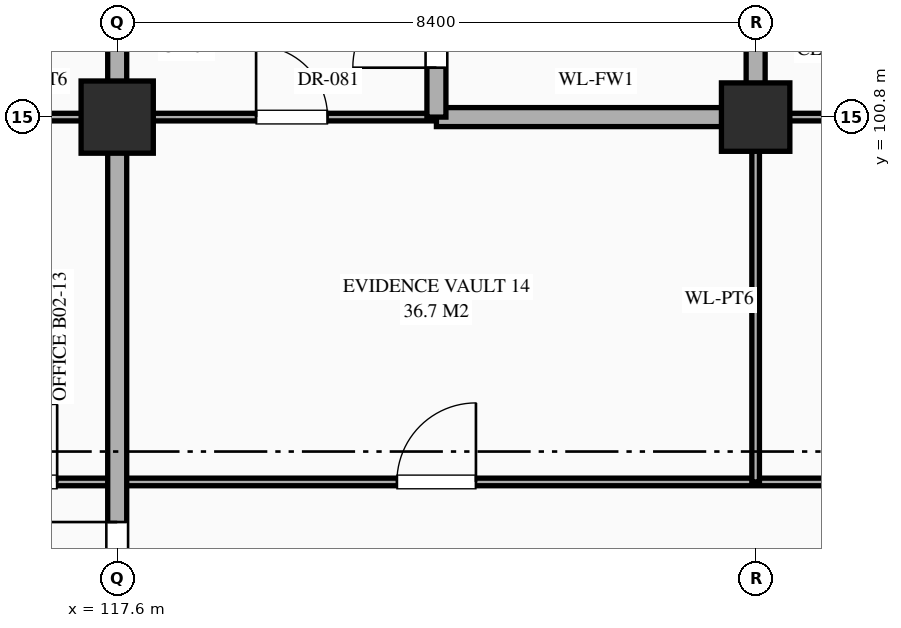
"""IFC4 building model, lengths in metres.
Left out: names, types, materials, properties, quantities, classifications, styles, units other than length and angle.
Written with IfcOpenShell. Run it as: python <this file> out.ifc"""

import sys

from ifc_helpers import new_model, si_unit, direction, frame, frame_2d, origin, origin_2d, place, context, subcontext, project, spatial, rectangle, extrude, element, fill, save


model = new_model("IFC4")
c1 = context("Model", 3, precision=1e-05, world=origin(), true_north=direction((0.0, 1.0)))
c2 = subcontext(c1, "Body", "Model", "MODEL_VIEW")
j1 = project(units=[si_unit("LENGTHUNIT", "METRE"), si_unit("PLANEANGLEUNIT", "RADIAN")], contexts=[c1])
p1 = place(None, origin())
s1 = spatial("IfcSite", under=j1, at=p1, CompositionType="ELEMENT")
p2 = place(p1, origin())
s2 = spatial("IfcBuilding", under=s1, at=p2, CompositionType="ELEMENT")
p3 = place(p2, frame((0.0, 0.0, -10.2)))
s3 = spatial("IfcBuildingStorey", under=s2, at=p3, CompositionType="ELEMENT", Elevation=-10.2)
p4 = place(p3, frame((117.6, 100.8, 0.0), z_axis=(0.0, 0.0, 1.0), x_axis=(1.0, 0.0, 0.0)))
e1 = element("IfcColumn", 1, at=p4, inside=s3, PredefinedType="COLUMN", context=c2, shape_type="SweptSolid", body=[
    extrude(rectangle(XDim=0.95, YDim=0.95, at=origin_2d()), origin(), (0.0, 0.0, 1.0), 4.8),
])
p5 = place(p3, frame((126.0, 100.8, 0.0), z_axis=(0.0, 0.0, 1.0), x_axis=(1.0, 0.0, 0.0)))
e2 = element("IfcColumn", 2, at=p5, inside=s3, PredefinedType="COLUMN", context=c2, shape_type="SweptSolid", body=[
    extrude(rectangle(XDim=0.9, YDim=0.9, at=origin_2d()), origin(), (0.0, 0.0, 1.0), 4.8),
])
p6 = place(p3, frame((0.04, 96.0, 0.0), z_axis=(0.0, 0.0, 1.0), x_axis=(1.0, 0.0, 0.0)))
e3 = element("IfcWall", 3, at=p6, inside=s3, PredefinedType="STANDARD", context=c2, shape_type="SweptSolid", body=[
    extrude(rectangle(XDim=151.16, YDim=0.1, at=frame_2d((75.58, 0.0))), origin(), (0.0, 0.0, 1.0), 4.48),
])
p7 = place(p6, frame((1.04, 0.0, 0.0)))
e4 = element("IfcOpeningElement", 4, at=p7, cuts=e3, PredefinedType="OPENING", context=c2, shape_type="SweptSolid", body=[
    extrude(rectangle(XDim=1.28, YDim=2.35, at=frame_2d((0.64, 1.175))), frame((0.0, 0.062, 0.0), z_axis=(0.0, -1.0, 0.0), x_axis=(1.0, 0.0, 0.0)), (0.0, 0.0, 1.0), 0.124),
])
p8 = place(p6, frame((4.09, 0.0, 0.0)))
e5 = element("IfcOpeningElement", 5, at=p8, cuts=e3, PredefinedType="OPENING", context=c2, shape_type="SweptSolid", body=[
    extrude(rectangle(XDim=0.94, YDim=2.3, at=frame_2d((0.47, 1.15))), frame((0.0, 0.062, 0.0), z_axis=(0.0, -1.0, 0.0), x_axis=(1.0, 0.0, 0.0)), (0.0, 0.0, 1.0), 0.124),
])
p9 = place(p6, frame((6.57, 0.0, 0.0)))
e6 = element("IfcOpeningElement", 6, at=p9, cuts=e3, PredefinedType="OPENING", context=c2, shape_type="SweptSolid", body=[
    extrude(rectangle(XDim=0.98, YDim=2.35, at=frame_2d((0.49, 1.175))), frame((0.0, 0.062, 0.0), z_axis=(0.0, -1.0, 0.0), x_axis=(1.0, 0.0, 0.0)), (0.0, 0.0, 1.0), 0.124),
])
p10 = place(p6, frame((12.05, 0.0, 0.0)))
e7 = element("IfcOpeningElement", 7, at=p10, cuts=e3, PredefinedType="OPENING", context=c2, shape_type="SweptSolid", body=[
    extrude(rectangle(XDim=1.02, YDim=2.4, at=frame_2d((0.51, 1.2))), frame((0.0, 0.062, 0.0), z_axis=(0.0, -1.0, 0.0), x_axis=(1.0, 0.0, 0.0)), (0.0, 0.0, 1.0), 0.124),
])
p11 = place(p6, frame((20.43, 0.0, 0.0)))
e8 = element("IfcOpeningElement", 8, at=p11, cuts=e3, PredefinedType="OPENING", context=c2, shape_type="SweptSolid", body=[
    extrude(rectangle(XDim=1.06, YDim=2.4, at=frame_2d((0.53, 1.2))), frame((0.0, 0.062, 0.0), z_axis=(0.0, -1.0, 0.0), x_axis=(1.0, 0.0, 0.0)), (0.0, 0.0, 1.0), 0.124),
])
p12 = place(p6, frame((26.29, 0.0, 0.0)))
e9 = element("IfcOpeningElement", 9, at=p12, cuts=e3, PredefinedType="OPENING", context=c2, shape_type="SweptSolid", body=[
    extrude(rectangle(XDim=1.14, YDim=2.4, at=frame_2d((0.57, 1.2))), frame((0.0, 0.062, 0.0), z_axis=(0.0, -1.0, 0.0), x_axis=(1.0, 0.0, 0.0)), (0.0, 0.0, 1.0), 0.124),
])
p13 = place(p6, frame((29.31, 0.0, 0.0)))
e10 = element("IfcOpeningElement", 10, at=p13, cuts=e3, PredefinedType="OPENING", context=c2, shape_type="SweptSolid", body=[
    extrude(rectangle(XDim=0.9, YDim=2.15, at=frame_2d((0.45, 1.075))), frame((0.0, 0.062, 0.0), z_axis=(0.0, -1.0, 0.0), x_axis=(1.0, 0.0, 0.0)), (0.0, 0.0, 1.0), 0.124),
])
p14 = place(p6, frame((31.83, 0.0, 0.0)))
e11 = element("IfcOpeningElement", 11, at=p14, cuts=e3, PredefinedType="OPENING", context=c2, shape_type="SweptSolid", body=[
    extrude(rectangle(XDim=0.86, YDim=2.1, at=frame_2d((0.43, 1.05))), frame((0.0, 0.062, 0.0), z_axis=(0.0, -1.0, 0.0), x_axis=(1.0, 0.0, 0.0)), (0.0, 0.0, 1.0), 0.124),
])
p15 = place(p6, frame((37.3, 0.0, 0.0)))
e12 = element("IfcOpeningElement", 12, at=p15, cuts=e3, PredefinedType="OPENING", context=c2, shape_type="SweptSolid", body=[
    extrude(rectangle(XDim=0.92, YDim=2.15, at=frame_2d((0.46, 1.075))), frame((0.0, 0.062, 0.0), z_axis=(0.0, -1.0, 0.0), x_axis=(1.0, 0.0, 0.0)), (0.0, 0.0, 1.0), 0.124),
])
p16 = place(p6, frame((45.68, 0.0, 0.0)))
e13 = element("IfcOpeningElement", 13, at=p16, cuts=e3, PredefinedType="OPENING", context=c2, shape_type="SweptSolid", body=[
    extrude(rectangle(XDim=0.96, YDim=2.2, at=frame_2d((0.48, 1.1))), frame((0.0, 0.062, 0.0), z_axis=(0.0, -1.0, 0.0), x_axis=(1.0, 0.0, 0.0)), (0.0, 0.0, 1.0), 0.124),
])
p17 = place(p6, frame((51.57, 0.0, 0.0)))
e14 = element("IfcOpeningElement", 14, at=p17, cuts=e3, PredefinedType="OPENING", context=c2, shape_type="SweptSolid", body=[
    extrude(rectangle(XDim=0.98, YDim=2.35, at=frame_2d((0.49, 1.175))), frame((0.0, 0.062, 0.0), z_axis=(0.0, -1.0, 0.0), x_axis=(1.0, 0.0, 0.0)), (0.0, 0.0, 1.0), 0.124),
])
p18 = place(p6, frame((54.45, 0.0, 0.0)))
e15 = element("IfcOpeningElement", 15, at=p18, cuts=e3, PredefinedType="OPENING", context=c2, shape_type="SweptSolid", body=[
    extrude(rectangle(XDim=1.02, YDim=2.4, at=frame_2d((0.51, 1.2))), frame((0.0, 0.062, 0.0), z_axis=(0.0, -1.0, 0.0), x_axis=(1.0, 0.0, 0.0)), (0.0, 0.0, 1.0), 0.124),
])
p19 = place(p6, frame((56.93, 0.0, 0.0)))
e16 = element("IfcOpeningElement", 16, at=p19, cuts=e3, PredefinedType="OPENING", context=c2, shape_type="SweptSolid", body=[
    extrude(rectangle(XDim=1.06, YDim=2.4, at=frame_2d((0.53, 1.2))), frame((0.0, 0.062, 0.0), z_axis=(0.0, -1.0, 0.0), x_axis=(1.0, 0.0, 0.0)), (0.0, 0.0, 1.0), 0.124),
])
p20 = place(p6, frame((62.39, 0.0, 0.0)))
e17 = element("IfcOpeningElement", 17, at=p20, cuts=e3, PredefinedType="OPENING", context=c2, shape_type="SweptSolid", body=[
    extrude(rectangle(XDim=1.14, YDim=2.4, at=frame_2d((0.57, 1.2))), frame((0.0, 0.062, 0.0), z_axis=(0.0, -1.0, 0.0), x_axis=(1.0, 0.0, 0.0)), (0.0, 0.0, 1.0), 0.124),
])
p21 = place(p6, frame((70.91, 0.0, 0.0)))
e18 = element("IfcOpeningElement", 18, at=p21, cuts=e3, PredefinedType="OPENING", context=c2, shape_type="SweptSolid", body=[
    extrude(rectangle(XDim=0.9, YDim=2.15, at=frame_2d((0.45, 1.075))), frame((0.0, 0.062, 0.0), z_axis=(0.0, -1.0, 0.0), x_axis=(1.0, 0.0, 0.0)), (0.0, 0.0, 1.0), 0.124),
])
p22 = place(p6, frame((79.33, 0.0, 0.0)))
e19 = element("IfcOpeningElement", 19, at=p22, cuts=e3, PredefinedType="OPENING", context=c2, shape_type="SweptSolid", body=[
    extrude(rectangle(XDim=0.86, YDim=2.1, at=frame_2d((0.43, 1.05))), frame((0.0, 0.062, 0.0), z_axis=(0.0, -1.0, 0.0), x_axis=(1.0, 0.0, 0.0)), (0.0, 0.0, 1.0), 0.124),
])
p23 = place(p6, frame((85.1, 0.0, 0.0)))
e20 = element("IfcOpeningElement", 20, at=p23, cuts=e3, PredefinedType="OPENING", context=c2, shape_type="SweptSolid", body=[
    extrude(rectangle(XDim=1.12, YDim=2.25, at=frame_2d((0.56, 1.125))), frame((0.0, 0.062, 0.0), z_axis=(0.0, -1.0, 0.0), x_axis=(1.0, 0.0, 0.0)), (0.0, 0.0, 1.0), 0.124),
])
p24 = place(p6, frame((87.98, 0.0, 0.0)))
e21 = element("IfcOpeningElement", 21, at=p24, cuts=e3, PredefinedType="OPENING", context=c2, shape_type="SweptSolid", body=[
    extrude(rectangle(XDim=1.16, YDim=2.3, at=frame_2d((0.58, 1.15))), frame((0.0, 0.062, 0.0), z_axis=(0.0, -1.0, 0.0), x_axis=(1.0, 0.0, 0.0)), (0.0, 0.0, 1.0), 0.124),
])
p25 = place(p6, frame((90.46, 0.0, 0.0)))
e22 = element("IfcOpeningElement", 22, at=p25, cuts=e3, PredefinedType="OPENING", context=c2, shape_type="SweptSolid", body=[
    extrude(rectangle(XDim=1.2, YDim=2.35, at=frame_2d((0.6, 1.175))), frame((0.0, 0.062, 0.0), z_axis=(0.0, -1.0, 0.0), x_axis=(1.0, 0.0, 0.0)), (0.0, 0.0, 1.0), 0.124),
])
p26 = place(p6, frame((95.94, 0.0, 0.0)))
e23 = element("IfcOpeningElement", 23, at=p26, cuts=e3, PredefinedType="OPENING", context=c2, shape_type="SweptSolid", body=[
    extrude(rectangle(XDim=1.24, YDim=2.3, at=frame_2d((0.62, 1.15))), frame((0.0, 0.062, 0.0), z_axis=(0.0, -1.0, 0.0), x_axis=(1.0, 0.0, 0.0)), (0.0, 0.0, 1.0), 0.124),
])
p27 = place(p6, frame((104.32, 0.0, 0.0)))
e24 = element("IfcOpeningElement", 24, at=p27, cuts=e3, PredefinedType="OPENING", context=c2, shape_type="SweptSolid", body=[
    extrude(rectangle(XDim=1.28, YDim=2.35, at=frame_2d((0.64, 1.175))), frame((0.0, 0.062, 0.0), z_axis=(0.0, -1.0, 0.0), x_axis=(1.0, 0.0, 0.0)), (0.0, 0.0, 1.0), 0.124),
])
p28 = place(p6, frame((110.39, 0.0, 0.0)))
e25 = element("IfcOpeningElement", 25, at=p28, cuts=e3, PredefinedType="OPENING", context=c2, shape_type="SweptSolid", body=[
    extrude(rectangle(XDim=0.94, YDim=2.3, at=frame_2d((0.47, 1.15))), frame((0.0, 0.062, 0.0), z_axis=(0.0, -1.0, 0.0), x_axis=(1.0, 0.0, 0.0)), (0.0, 0.0, 1.0), 0.124),
])
p29 = place(p6, frame((113.27, 0.0, 0.0)))
e26 = element("IfcOpeningElement", 26, at=p29, cuts=e3, PredefinedType="OPENING", context=c2, shape_type="SweptSolid", body=[
    extrude(rectangle(XDim=0.98, YDim=2.35, at=frame_2d((0.49, 1.175))), frame((0.0, 0.062, 0.0), z_axis=(0.0, -1.0, 0.0), x_axis=(1.0, 0.0, 0.0)), (0.0, 0.0, 1.0), 0.124),
])
p30 = place(p6, frame((115.75, 0.0, 0.0)))
e27 = element("IfcOpeningElement", 27, at=p30, cuts=e3, PredefinedType="OPENING", context=c2, shape_type="SweptSolid", body=[
    extrude(rectangle(XDim=1.02, YDim=2.4, at=frame_2d((0.51, 1.2))), frame((0.0, 0.062, 0.0), z_axis=(0.0, -1.0, 0.0), x_axis=(1.0, 0.0, 0.0)), (0.0, 0.0, 1.0), 0.124),
])
p31 = place(p6, frame((121.24, 0.0, 0.0)))
e28 = element("IfcOpeningElement", 28, at=p31, cuts=e3, PredefinedType="OPENING", context=c2, shape_type="SweptSolid", body=[
    extrude(rectangle(XDim=1.04, YDim=2.2, at=frame_2d((0.52, 1.1))), frame((0.0, 0.062, 0.0), z_axis=(0.0, -1.0, 0.0), x_axis=(1.0, 0.0, 0.0)), (0.0, 0.0, 1.0), 0.124),
])
p32 = place(p6, frame((129.62, 0.0, 0.0)))
e29 = element("IfcOpeningElement", 29, at=p32, cuts=e3, PredefinedType="OPENING", context=c2, shape_type="SweptSolid", body=[
    extrude(rectangle(XDim=1.08, YDim=2.25, at=frame_2d((0.54, 1.125))), frame((0.0, 0.062, 0.0), z_axis=(0.0, -1.0, 0.0), x_axis=(1.0, 0.0, 0.0)), (0.0, 0.0, 1.0), 0.124),
])
p33 = place(p6, frame((135.5, 0.0, 0.0)))
e30 = element("IfcOpeningElement", 30, at=p33, cuts=e3, PredefinedType="OPENING", context=c2, shape_type="SweptSolid", body=[
    extrude(rectangle(XDim=1.12, YDim=2.25, at=frame_2d((0.56, 1.125))), frame((0.0, 0.062, 0.0), z_axis=(0.0, -1.0, 0.0), x_axis=(1.0, 0.0, 0.0)), (0.0, 0.0, 1.0), 0.124),
])
p34 = place(p6, frame((138.38, 0.0, 0.0)))
e31 = element("IfcOpeningElement", 31, at=p34, cuts=e3, PredefinedType="OPENING", context=c2, shape_type="SweptSolid", body=[
    extrude(rectangle(XDim=1.16, YDim=2.3, at=frame_2d((0.58, 1.15))), frame((0.0, 0.062, 0.0), z_axis=(0.0, -1.0, 0.0), x_axis=(1.0, 0.0, 0.0)), (0.0, 0.0, 1.0), 0.124),
])
p35 = place(p6, frame((140.86, 0.0, 0.0)))
e32 = element("IfcOpeningElement", 32, at=p35, cuts=e3, PredefinedType="OPENING", context=c2, shape_type="SweptSolid", body=[
    extrude(rectangle(XDim=1.2, YDim=2.35, at=frame_2d((0.6, 1.175))), frame((0.0, 0.062, 0.0), z_axis=(0.0, -1.0, 0.0), x_axis=(1.0, 0.0, 0.0)), (0.0, 0.0, 1.0), 0.124),
])
p36 = place(p6, frame((146.34, 0.0, 0.0)))
e33 = element("IfcOpeningElement", 33, at=p36, cuts=e3, PredefinedType="OPENING", context=c2, shape_type="SweptSolid", body=[
    extrude(rectangle(XDim=1.24, YDim=2.3, at=frame_2d((0.62, 1.15))), frame((0.0, 0.062, 0.0), z_axis=(0.0, -1.0, 0.0), x_axis=(1.0, 0.0, 0.0)), (0.0, 0.0, 1.0), 0.124),
])
p37 = place(p3, frame((109.2, 100.8, 0.0), z_axis=(0.0, 0.0, 1.0), x_axis=(1.0, 0.0, 0.0)))
e34 = element("IfcWall", 34, at=p37, inside=s3, PredefinedType="STANDARD", context=c2, shape_type="SweptSolid", body=[
    extrude(rectangle(XDim=12.6, YDim=0.1, at=frame_2d((6.3, 0.0))), origin(), (0.0, 0.0, 1.0), 3.63),
])
p38 = place(p37, frame((10.228, 0.0, 0.0)))
e35 = element("IfcOpeningElement", 35, at=p38, cuts=e34, PredefinedType="OPENING", context=c2, shape_type="SweptSolid", body=[
    extrude(rectangle(XDim=0.94, YDim=2.3, at=frame_2d((0.47, 1.15))), frame((0.0, 0.062, 0.0), z_axis=(0.0, -1.0, 0.0), x_axis=(1.0, 0.0, 0.0)), (0.0, 0.0, 1.0), 0.124),
])
p39 = place(p37, frame((1.468, 0.0, 0.0)))
e36 = element("IfcOpeningElement", 36, at=p39, cuts=e34, PredefinedType="OPENING", context=c2, shape_type="SweptSolid", body=[
    extrude(rectangle(XDim=0.86, YDim=2.1, at=frame_2d((0.43, 1.05))), frame((0.0, 0.062, 0.0), z_axis=(0.0, -1.0, 0.0), x_axis=(1.0, 0.0, 0.0)), (0.0, 0.0, 1.0), 0.124),
])
p40 = place(p37, frame((4.14, 0.0, 0.0)))
e37 = element("IfcOpeningElement", 37, at=p40, cuts=e34, PredefinedType="OPENING", context=c2, shape_type="SweptSolid", body=[
    extrude(rectangle(XDim=0.92, YDim=2.15, at=frame_2d((0.46, 1.075))), frame((0.0, 0.062, 0.0), z_axis=(0.0, -1.0, 0.0), x_axis=(1.0, 0.0, 0.0)), (0.0, 0.0, 1.0), 0.124),
])
p41 = place(p37, frame((6.423, 0.0, 0.0)))
e38 = element("IfcOpeningElement", 38, at=p41, cuts=e34, PredefinedType="OPENING", context=c2, shape_type="SweptSolid", body=[
    extrude(rectangle(XDim=0.96, YDim=2.2, at=frame_2d((0.48, 1.1))), frame((0.0, 0.062, 0.0), z_axis=(0.0, -1.0, 0.0), x_axis=(1.0, 0.0, 0.0)), (0.0, 0.0, 1.0), 0.124),
])
p42 = place(p3, frame((121.8, 100.8, 0.0), z_axis=(0.0, 0.0, 1.0), x_axis=(1.0, 0.0, 0.0)))
e39 = element("IfcWall", 39, at=p42, inside=s3, PredefinedType="STANDARD", context=c2, shape_type="SweptSolid", body=[
    extrude(rectangle(XDim=4.2, YDim=0.25, at=frame_2d((2.1, 0.0))), origin(), (0.0, 0.0, 1.0), 3.63),
])
p43 = place(p3, frame((126.0, 100.8, 0.0), z_axis=(0.0, 0.0, 1.0), x_axis=(1.0, 0.0, 0.0)))
e40 = element("IfcWall", 40, at=p43, inside=s3, PredefinedType="STANDARD", context=c2, shape_type="SweptSolid", body=[
    extrude(rectangle(XDim=25.2, YDim=0.1, at=frame_2d((12.6, 0.0))), origin(), (0.0, 0.0, 1.0), 3.63),
])
p44 = place(p43, frame((3.62, 0.0, 0.0)))
e41 = element("IfcOpeningElement", 41, at=p44, cuts=e40, PredefinedType="OPENING", context=c2, shape_type="SweptSolid", body=[
    extrude(rectangle(XDim=1.16, YDim=2.3, at=frame_2d((0.58, 1.15))), frame((0.0, 0.062, 0.0), z_axis=(0.0, -1.0, 0.0), x_axis=(1.0, 0.0, 0.0)), (0.0, 0.0, 1.0), 0.124),
])
p45 = place(p43, frame((9.685, 0.0, 0.0)))
e42 = element("IfcOpeningElement", 42, at=p45, cuts=e40, PredefinedType="OPENING", context=c2, shape_type="SweptSolid", body=[
    extrude(rectangle(XDim=1.2, YDim=2.35, at=frame_2d((0.6, 1.175))), frame((0.0, 0.062, 0.0), z_axis=(0.0, -1.0, 0.0), x_axis=(1.0, 0.0, 0.0)), (0.0, 0.0, 1.0), 0.124),
])
p46 = place(p43, frame((12.38, 0.0, 0.0)))
e43 = element("IfcOpeningElement", 43, at=p46, cuts=e40, PredefinedType="OPENING", context=c2, shape_type="SweptSolid", body=[
    extrude(rectangle(XDim=1.24, YDim=2.3, at=frame_2d((0.62, 1.15))), frame((0.0, 0.062, 0.0), z_axis=(0.0, -1.0, 0.0), x_axis=(1.0, 0.0, 0.0)), (0.0, 0.0, 1.0), 0.124),
])
p47 = place(p43, frame((14.675, 0.0, 0.0)))
e44 = element("IfcOpeningElement", 44, at=p47, cuts=e40, PredefinedType="OPENING", context=c2, shape_type="SweptSolid", body=[
    extrude(rectangle(XDim=1.28, YDim=2.35, at=frame_2d((0.64, 1.175))), frame((0.0, 0.062, 0.0), z_axis=(0.0, -1.0, 0.0), x_axis=(1.0, 0.0, 0.0)), (0.0, 0.0, 1.0), 0.124),
])
p48 = place(p43, frame((20.542, 0.0, 0.0)))
e45 = element("IfcOpeningElement", 45, at=p48, cuts=e40, PredefinedType="OPENING", context=c2, shape_type="SweptSolid", body=[
    extrude(rectangle(XDim=0.94, YDim=2.3, at=frame_2d((0.47, 1.15))), frame((0.0, 0.062, 0.0), z_axis=(0.0, -1.0, 0.0), x_axis=(1.0, 0.0, 0.0)), (0.0, 0.0, 1.0), 0.124),
])
p49 = place(p3, frame((117.6, 91.2, 0.0), z_axis=(0.0, 0.0, 1.0), x_axis=(0.0, 1.0, 0.0)))
e46 = element("IfcWall", 46, at=p49, inside=s3, PredefinedType="STANDARD", context=c2, shape_type="SweptSolid", body=[
    extrude(rectangle(XDim=23.96, YDim=0.25, at=frame_2d((11.98, 0.0))), origin(), (0.0, 0.0, 1.0), 3.73),
])
p50 = place(p49, frame((0.452, 0.0, 0.0)))
e47 = element("IfcOpeningElement", 47, at=p50, cuts=e46, PredefinedType="OPENING", context=c2, shape_type="SweptSolid", body=[
    extrude(rectangle(XDim=1.1, YDim=2.2, at=frame_2d((0.55, 1.1))), frame((0.0, 0.137, 0.0), z_axis=(0.0, -1.0, 0.0), x_axis=(1.0, 0.0, 0.0)), (0.0, 0.0, 1.0), 0.274),
])
p51 = place(p49, frame((10.498, 0.0, 0.0)))
e48 = element("IfcOpeningElement", 48, at=p51, cuts=e46, PredefinedType="OPENING", context=c2, shape_type="SweptSolid", body=[
    extrude(rectangle(XDim=1.0, YDim=2.2, at=frame_2d((0.5, 1.1))), frame((0.0, 0.137, 0.0), z_axis=(0.0, -1.0, 0.0), x_axis=(1.0, 0.0, 0.0)), (0.0, 0.0, 1.0), 0.274),
])
p52 = place(p49, frame((3.323, 0.0, 0.0)))
e49 = element("IfcOpeningElement", 49, at=p52, cuts=e46, PredefinedType="OPENING", context=c2, shape_type="SweptSolid", body=[
    extrude(rectangle(XDim=0.95, YDim=2.15, at=frame_2d((0.475, 1.075))), frame((0.0, 0.137, 0.0), z_axis=(0.0, -1.0, 0.0), x_axis=(1.0, 0.0, 0.0)), (0.0, 0.0, 1.0), 0.274),
])
p53 = place(p49, frame((17.698, 0.0, 0.0)))
e50 = element("IfcOpeningElement", 50, at=p53, cuts=e46, PredefinedType="OPENING", context=c2, shape_type="SweptSolid", body=[
    extrude(rectangle(XDim=1.0, YDim=2.2, at=frame_2d((0.5, 1.1))), frame((0.0, 0.137, 0.0), z_axis=(0.0, -1.0, 0.0), x_axis=(1.0, 0.0, 0.0)), (0.0, 0.0, 1.0), 0.274),
])
p54 = place(p3, frame((121.8, 100.8, 0.0), z_axis=(0.0, 0.0, 1.0), x_axis=(0.0, 1.0, 0.0)))
e51 = element("IfcWall", 51, at=p54, inside=s3, PredefinedType="STANDARD", context=c2, shape_type="SweptSolid", body=[
    extrude(rectangle(XDim=3.6, YDim=0.25, at=frame_2d((1.8, 0.0))), origin(), (0.0, 0.0, 1.0), 4.48),
])
p55 = place(p54, frame((0.65, 0.0, 0.0)))
e52 = element("IfcOpeningElement", 52, at=p55, cuts=e51, PredefinedType="OPENING", context=c2, shape_type="SweptSolid", body=[
    extrude(rectangle(XDim=1.1, YDim=2.2, at=frame_2d((0.55, 1.1))), frame((0.0, 0.137, 0.0), z_axis=(0.0, -1.0, 0.0), x_axis=(1.0, 0.0, 0.0)), (0.0, 0.0, 1.0), 0.274),
])
p56 = place(p3, frame((126.0, 96.0, 0.0), z_axis=(0.0, 0.0, 1.0), x_axis=(0.0, 1.0, 0.0)))
e53 = element("IfcWall", 53, at=p56, inside=s3, PredefinedType="STANDARD", context=c2, shape_type="SweptSolid", body=[
    extrude(rectangle(XDim=4.8, YDim=0.1, at=frame_2d((2.4, 0.0))), origin(), (0.0, 0.0, 1.0), 3.73),
])
p57 = place(p3, frame((126.0, 100.8, 0.0), z_axis=(0.0, 0.0, 1.0), x_axis=(0.0, 1.0, 0.0)))
e54 = element("IfcWall", 54, at=p57, inside=s3, PredefinedType="STANDARD", context=c2, shape_type="SweptSolid", body=[
    extrude(rectangle(XDim=3.6, YDim=0.25, at=frame_2d((1.8, 0.0))), origin(), (0.0, 0.0, 1.0), 3.73),
])
p58 = place(p57, frame((0.885, 0.0, 0.0)))
e55 = element("IfcOpeningElement", 55, at=p58, cuts=e54, PredefinedType="OPENING", context=c2, shape_type="SweptSolid", body=[
    extrude(rectangle(XDim=1.0, YDim=2.2, at=frame_2d((0.5, 1.1))), frame((0.0, 0.137, 0.0), z_axis=(0.0, -1.0, 0.0), x_axis=(1.0, 0.0, 0.0)), (0.0, 0.0, 1.0), 0.274),
])
p59 = place(p55, origin())
e56 = element("IfcDoor", 56, at=p59, inside=s3, OperationType="SINGLE_SWING_LEFT", PredefinedType="DOOR", context=c2, shape_type="SweptSolid", body=[
    extrude(rectangle(XDim=1.1, YDim=2.2, at=frame_2d((0.55, 1.1))), frame((0.0, 0.025, 0.0), z_axis=(0.0, -1.0, 0.0), x_axis=(1.0, 0.0, 0.0)), (0.0, 0.0, 1.0), 0.05),
])
fill(e52, e56)
p60 = place(p38, origin())
e57 = element("IfcDoor", 57, at=p60, inside=s3, OperationType="SINGLE_SWING_LEFT", PredefinedType="DOOR", context=c2, shape_type="SweptSolid", body=[
    extrude(rectangle(XDim=0.94, YDim=2.3, at=frame_2d((0.47, 1.15))), frame((0.0, 0.025, 0.0), z_axis=(0.0, -1.0, 0.0), x_axis=(1.0, 0.0, 0.0)), (0.0, 0.0, 1.0), 0.05),
])
fill(e35, e57)
p61 = place(p52, origin())
e58 = element("IfcDoor", 58, at=p61, inside=s3, OperationType="SINGLE_SWING_RIGHT", PredefinedType="DOOR", context=c2, shape_type="SweptSolid", body=[
    extrude(rectangle(XDim=0.95, YDim=2.15, at=frame_2d((0.475, 1.075))), frame((0.0, 0.025, 0.0), z_axis=(0.0, -1.0, 0.0), x_axis=(1.0, 0.0, 0.0)), (0.0, 0.0, 1.0), 0.05),
])
fill(e49, e58)
p62 = place(p30, origin())
e59 = element("IfcDoor", 59, at=p62, inside=s3, OperationType="SINGLE_SWING_RIGHT", PredefinedType="DOOR", context=c2, shape_type="SweptSolid", body=[
    extrude(rectangle(XDim=1.02, YDim=2.4, at=frame_2d((0.51, 1.2))), frame((0.0, 0.025, 0.0), z_axis=(0.0, -1.0, 0.0), x_axis=(1.0, 0.0, 0.0)), (0.0, 0.0, 1.0), 0.05),
])
fill(e27, e59)
p63 = place(p31, origin())
e60 = element("IfcDoor", 60, at=p63, inside=s3, OperationType="SINGLE_SWING_RIGHT", PredefinedType="DOOR", context=c2, shape_type="SweptSolid", body=[
    extrude(rectangle(XDim=1.04, YDim=2.2, at=frame_2d((0.52, 1.1))), frame((0.0, 0.025, 0.0), z_axis=(0.0, -1.0, 0.0), x_axis=(1.0, 0.0, 0.0)), (0.0, 0.0, 1.0), 0.05),
])
fill(e28, e60)
save(model, sys.argv[1])
